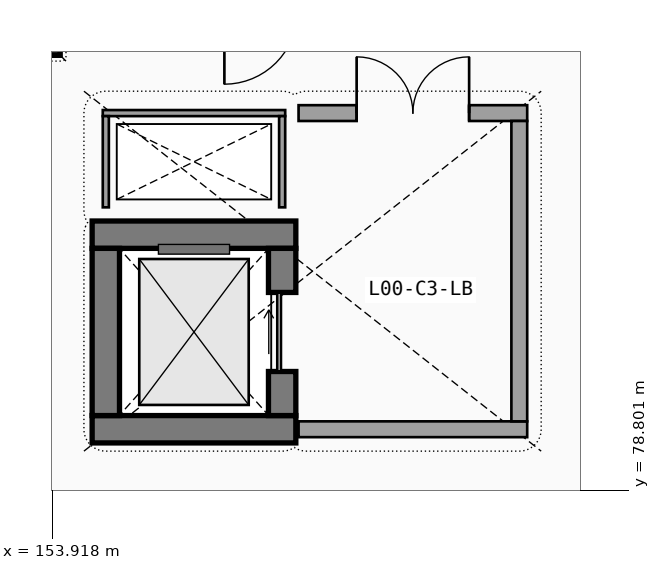
"""IFC4 building model, lengths in metres.
Left out: names, types, materials, properties, quantities, classifications, styles, units other than length and angle.
Written with IfcOpenShell. Run it as: python <this file> out.ifc"""

import sys

from ifc_helpers import new_model, si_unit, direction, frame, frame_2d, origin, origin_2d, place, context, subcontext, project, spatial, rectangle, extrude, element, fill, save


model = new_model("IFC4")
c1 = context("Model", 3, precision=1e-05, world=origin(), true_north=direction((0.0, 1.0)))
c2 = subcontext(c1, "Body", "Model", "MODEL_VIEW")
j1 = project(units=[si_unit("LENGTHUNIT", "METRE"), si_unit("PLANEANGLEUNIT", "RADIAN")], contexts=[c1])
p1 = place(None, origin())
s1 = spatial("IfcSite", under=j1, at=p1, CompositionType="ELEMENT")
p2 = place(p1, origin())
s2 = spatial("IfcBuilding", under=s1, at=p2, CompositionType="ELEMENT")
p3 = place(p2, origin())
s3 = spatial("IfcBuildingStorey", under=s2, at=p3, CompositionType="ELEMENT", Elevation=0.0)
p4 = place(p3, frame((153.6, 86.4, 0.0), z_axis=(0.0, 0.0, 1.0), x_axis=(1.0, 0.0, 0.0)))
e1 = element("IfcColumn", 1, at=p4, inside=s3, PredefinedType="COLUMN", context=c2, shape_type="SweptSolid", body=[
    extrude(rectangle(XDim=0.9, YDim=0.9, at=origin_2d()), origin(), (0.0, 0.0, 1.0), 4.8),
])
for number, where, z_axis, x_axis in (
    (2, (154.575, 79.8, 0.0), (0.0, 0.0, 1.0), (1.0, 0.0, 0.0)),
    (3, (157.925, 83.0, 0.0), (0.0, 0.0, 1.0), (-1.0, 0.0, 0.0)),
):
    element("IfcWall", number, at=place(p3, frame(where, z_axis=z_axis, x_axis=x_axis)), inside=s3, PredefinedType="SHEAR", context=c2, shape_type="SweptSolid", body=[
        extrude(rectangle(XDim=3.35, YDim=0.45, at=frame_2d((1.675, 0.0))), origin(), (0.0, 0.0, 1.0), 4.5),
    ])
p5 = place(p3, frame((154.8, 82.775, 0.0), z_axis=(0.0, 0.0, 1.0), x_axis=(0.0, -1.0, 0.0)))
e4 = element("IfcWall", 4, at=p5, inside=s3, PredefinedType="SHEAR", context=c2, shape_type="SweptSolid", body=[
    extrude(rectangle(XDim=2.75, YDim=0.45, at=frame_2d((1.375, 0.0))), origin(), (0.0, 0.0, 1.0), 4.5),
])
p6 = place(p3, frame((157.7, 80.025, 0.0), z_axis=(0.0, 0.0, 1.0), x_axis=(0.0, 1.0, 0.0)))
e5 = element("IfcWall", 5, at=p6, inside=s3, PredefinedType="SHEAR", context=c2, shape_type="SweptSolid", body=[
    extrude(rectangle(XDim=2.75, YDim=0.45, at=frame_2d((1.375, 0.0))), origin(), (0.0, 0.0, 1.0), 4.5),
])
p7 = place(p6, frame((0.725, 0.0, 0.0), z_axis=(0.0, 0.0, 1.0), x_axis=(1.0, 0.0, 0.0)))
e6 = element("IfcOpeningElement", 6, at=p7, cuts=e5, PredefinedType="OPENING", context=c2, shape_type="SweptSolid", body=[
    extrude(rectangle(XDim=1.3, YDim=2.25, at=frame_2d((0.65, 1.125))), frame((0.0, 0.235, 0.0), z_axis=(0.0, -1.0, 0.0), x_axis=(1.0, 0.0, 0.0)), (0.0, 0.0, 1.0), 0.47),
])
p8 = place(p3, frame((157.75, 85.0, 0.0), z_axis=(0.0, 0.0, 1.0), x_axis=(-1.0, 0.0, 0.0)))
e7 = element("IfcWall", 7, at=p8, inside=s3, PredefinedType="PARTITIONING", context=c2, shape_type="SweptSolid", body=[
    extrude(rectangle(XDim=3.0, YDim=0.1, at=frame_2d((1.5, 0.0))), origin(), (0.0, 0.0, 1.0), 4.5),
])
for number, where, z_axis, x_axis in (
    (8, (154.8, 84.95, 0.0), (0.0, 0.0, 1.0), (0.0, -1.0, 0.0)),
    (9, (157.7, 83.45, 0.0), (0.0, 0.0, 1.0), (0.0, 1.0, 0.0)),
):
    element("IfcWall", number, at=place(p3, frame(where, z_axis=z_axis, x_axis=x_axis)), inside=s3, PredefinedType="PARTITIONING", context=c2, shape_type="SweptSolid", body=[
        extrude(rectangle(XDim=1.5, YDim=0.1, at=frame_2d((0.75, 0.0))), origin(), (0.0, 0.0, 1.0), 4.5),
    ])
p9 = place(p3, frame((157.97, 79.8, 0.0), z_axis=(0.0, 0.0, 1.0), x_axis=(1.0, 0.0, 0.0)))
e10 = element("IfcWall", 10, at=p9, inside=s3, PredefinedType="SOLIDWALL", context=c2, shape_type="SweptSolid", body=[
    extrude(rectangle(XDim=3.76, YDim=0.26, at=frame_2d((1.88, 0.0))), origin(), (0.0, 0.0, 1.0), 4.5),
])
p10 = place(p3, frame((161.73, 85.0, 0.0), z_axis=(0.0, 0.0, 1.0), x_axis=(-1.0, 0.0, 0.0)))
e11 = element("IfcWall", 11, at=p10, inside=s3, PredefinedType="SOLIDWALL", context=c2, shape_type="SweptSolid", body=[
    extrude(rectangle(XDim=3.76, YDim=0.26, at=frame_2d((1.88, 0.0))), origin(), (0.0, 0.0, 1.0), 4.5),
])
p11 = place(p10, frame((2.805, 0.0, 0.0), z_axis=(0.0, 0.0, 1.0), x_axis=(-1.0, 0.0, 0.0)))
e12 = element("IfcOpeningElement", 12, at=p11, cuts=e11, PredefinedType="OPENING", context=c2, shape_type="SweptSolid", body=[
    extrude(rectangle(XDim=1.85, YDim=2.25, at=frame_2d((0.925, 1.125))), frame((0.0, 0.14, 0.0), z_axis=(0.0, -1.0, 0.0), x_axis=(1.0, 0.0, 0.0)), (0.0, 0.0, 1.0), 0.28),
])
p12 = place(p3, frame((161.6, 79.93, 0.0), z_axis=(0.0, 0.0, 1.0), x_axis=(0.0, 1.0, 0.0)))
e13 = element("IfcWall", 13, at=p12, inside=s3, PredefinedType="SOLIDWALL", context=c2, shape_type="SweptSolid", body=[
    extrude(rectangle(XDim=4.94, YDim=0.26, at=frame_2d((2.47, 0.0))), origin(), (0.0, 0.0, 1.0), 4.5),
])
p13 = place(p7, origin())
e14 = element("IfcDoor", 14, at=p13, inside=s3, OperationType="SLIDING_TO_RIGHT", PredefinedType="DOOR", context=c2, shape_type="SweptSolid", body=[
    extrude(rectangle(XDim=1.3, YDim=2.25, at=frame_2d((0.65, 1.125))), frame((0.0, 0.025, 0.0), z_axis=(0.0, -1.0, 0.0), x_axis=(1.0, 0.0, 0.0)), (0.0, 0.0, 1.0), 0.05),
])
fill(e6, e14)
p14 = place(p11, origin())
e15 = element("IfcDoor", 15, at=p14, inside=s3, OperationType="DOUBLE_DOOR_SINGLE_SWING", PredefinedType="DOOR", context=c2, shape_type="SweptSolid", body=[
    extrude(rectangle(XDim=1.85, YDim=2.25, at=frame_2d((0.925, 1.125))), frame((0.0, 0.025, 0.0), z_axis=(0.0, -1.0, 0.0), x_axis=(1.0, 0.0, 0.0)), (0.0, 0.0, 1.0), 0.05),
])
fill(e12, e15)
save(model, sys.argv[1])
